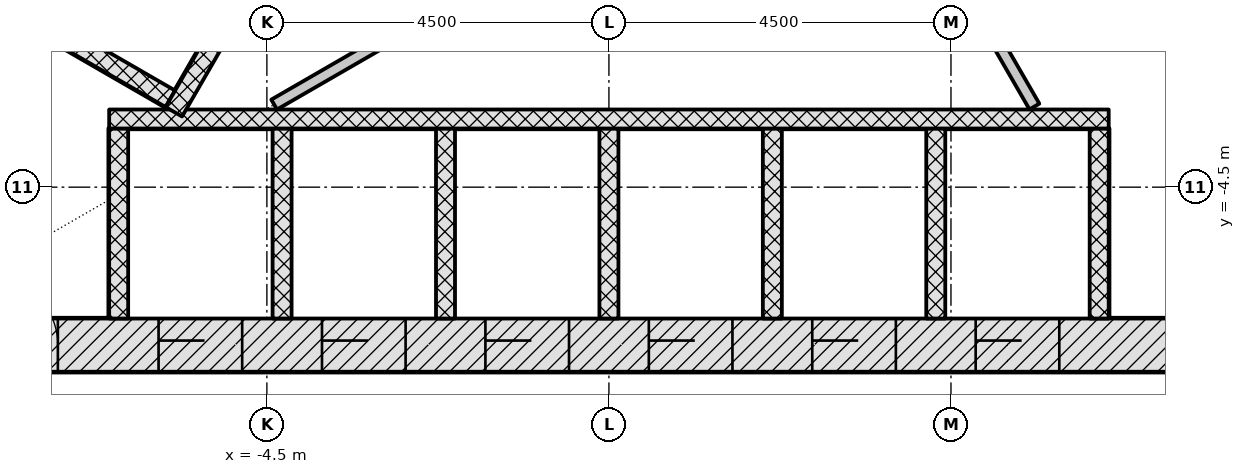
"""IFC4 building model, lengths in metres.
Left out: names, types, materials, properties, quantities, classifications, styles, units other than length and angle.
Written with IfcOpenShell. Run it as: python <this file> out.ifc"""

import sys

from ifc_helpers import new_model, si_unit, direction, frame, frame_2d, origin, place, context, subcontext, project, spatial, rectangle, extrude, element, fill, save


model = new_model("IFC4")
c1 = context("Model", 3, precision=1e-05, world=origin(), true_north=direction((0.0, 1.0)))
c2 = subcontext(c1, "Body", "Model", "MODEL_VIEW")
j1 = project(units=[si_unit("LENGTHUNIT", "METRE"), si_unit("PLANEANGLEUNIT", "RADIAN")], contexts=[c1])
p1 = place(None, origin())
s1 = spatial("IfcSite", under=j1, at=p1, CompositionType="ELEMENT")
p2 = place(p1, origin())
s2 = spatial("IfcBuilding", under=s1, at=p2, CompositionType="ELEMENT")
p3 = place(p2, frame((0.0, 0.0, 91.5)))
s3 = spatial("IfcBuildingStorey", under=s2, at=p3, CompositionType="ELEMENT", Elevation=91.5)
p4 = place(p3, frame((-9.229, -6.578, -0.2), z_axis=(0.0, 0.0, 1.0), x_axis=(1.0, 0.0, 0.0)))
e1 = element("IfcWall", 1, at=p4, inside=s3, PredefinedType="SHEAR", context=c2, shape_type="SweptSolid", body=[
    extrude(rectangle(XDim=18.458, YDim=0.7, at=frame_2d((9.229, 0.0))), origin(), (0.0, 0.0, 1.0), 3.6),
])
p5 = place(p4, frame((3.304, 0.0, 0.2)))
e2 = element("IfcOpeningElement", 2, at=p5, cuts=e1, PredefinedType="OPENING", context=c2, shape_type="SweptSolid", body=[
    extrude(rectangle(XDim=1.1, YDim=2.1, at=frame_2d((0.55, 1.05))), frame((0.0, 0.36, 0.0), z_axis=(0.0, -1.0, 0.0), x_axis=(1.0, 0.0, 0.0)), (0.0, 0.0, 1.0), 0.72),
])
p6 = place(p4, frame((5.454, 0.0, 0.2)))
e3 = element("IfcOpeningElement", 3, at=p6, cuts=e1, PredefinedType="OPENING", context=c2, shape_type="SweptSolid", body=[
    extrude(rectangle(XDim=1.1, YDim=2.1, at=frame_2d((0.55, 1.05))), frame((0.0, 0.36, 0.0), z_axis=(0.0, -1.0, 0.0), x_axis=(1.0, 0.0, 0.0)), (0.0, 0.0, 1.0), 0.72),
])
p7 = place(p4, frame((7.604, 0.0, 0.2)))
e4 = element("IfcOpeningElement", 4, at=p7, cuts=e1, PredefinedType="OPENING", context=c2, shape_type="SweptSolid", body=[
    extrude(rectangle(XDim=1.1, YDim=2.1, at=frame_2d((0.55, 1.05))), frame((0.0, 0.36, 0.0), z_axis=(0.0, -1.0, 0.0), x_axis=(1.0, 0.0, 0.0)), (0.0, 0.0, 1.0), 0.72),
])
p8 = place(p4, frame((9.754, 0.0, 0.2)))
e5 = element("IfcOpeningElement", 5, at=p8, cuts=e1, PredefinedType="OPENING", context=c2, shape_type="SweptSolid", body=[
    extrude(rectangle(XDim=1.1, YDim=2.1, at=frame_2d((0.55, 1.05))), frame((0.0, 0.36, 0.0), z_axis=(0.0, -1.0, 0.0), x_axis=(1.0, 0.0, 0.0)), (0.0, 0.0, 1.0), 0.72),
])
p9 = place(p4, frame((11.904, 0.0, 0.2)))
e6 = element("IfcOpeningElement", 6, at=p9, cuts=e1, PredefinedType="OPENING", context=c2, shape_type="SweptSolid", body=[
    extrude(rectangle(XDim=1.1, YDim=2.1, at=frame_2d((0.55, 1.05))), frame((0.0, 0.36, 0.0), z_axis=(0.0, -1.0, 0.0), x_axis=(1.0, 0.0, 0.0)), (0.0, 0.0, 1.0), 0.72),
])
p10 = place(p4, frame((14.054, 0.0, 0.2)))
e7 = element("IfcOpeningElement", 7, at=p10, cuts=e1, PredefinedType="OPENING", context=c2, shape_type="SweptSolid", body=[
    extrude(rectangle(XDim=1.1, YDim=2.1, at=frame_2d((0.55, 1.05))), frame((0.0, 0.36, 0.0), z_axis=(0.0, -1.0, 0.0), x_axis=(1.0, 0.0, 0.0)), (0.0, 0.0, 1.0), 0.72),
])
p11 = place(p4, frame((1.079, 0.0, 0.2)))
e8 = element("IfcOpeningElement", 8, at=p11, cuts=e1, PredefinedType="OPENING", context=c2, shape_type="SweptSolid", body=[
    extrude(rectangle(XDim=0.9, YDim=2.1, at=frame_2d((0.45, 1.05))), frame((0.0, 0.36, 0.0), z_axis=(0.0, -1.0, 0.0), x_axis=(1.0, 0.0, 0.0)), (0.0, 0.0, 1.0), 0.72),
])
p12 = place(p3, frame((10.311, -4.703, -0.2), z_axis=(0.0, 0.0, 1.0), x_axis=(-0.500001446645, 0.866024568562, 0.0)))
e9 = element("IfcWall", 9, at=p12, inside=s3, PredefinedType="SHEAR", context=c2, shape_type="SweptSolid", body=[
    extrude(rectangle(XDim=18.458, YDim=0.7, at=frame_2d((9.229, 0.0))), origin(), (0.0, 0.0, 1.0), 3.6),
])
p13 = place(p12, frame((8.7, 0.0, 0.2)))
e10 = element("IfcOpeningElement", 10, at=p13, cuts=e9, PredefinedType="OPENING", context=c2, shape_type="SweptSolid", body=[
    extrude(rectangle(XDim=1.0, YDim=2.1, at=frame_2d((0.5, 1.05))), frame((0.0, 0.36, 0.0), z_axis=(0.0, -1.0, 0.0), x_axis=(1.0, 0.0, 0.0)), (0.0, 0.0, 1.0), 0.72),
])
p14 = place(p12, frame((3.99, 0.0, 0.2)))
e11 = element("IfcOpeningElement", 11, at=p14, cuts=e9, PredefinedType="OPENING", context=c2, shape_type="SweptSolid", body=[
    extrude(rectangle(XDim=0.9, YDim=2.1, at=frame_2d((0.45, 1.05))), frame((0.0, 0.36, 0.0), z_axis=(0.0, -1.0, 0.0), x_axis=(1.0, 0.0, 0.0)), (0.0, 0.0, 1.0), 0.72),
])
p15 = place(p12, frame((13.539, 0.0, 0.2)))
e12 = element("IfcOpeningElement", 12, at=p15, cuts=e9, PredefinedType="OPENING", context=c2, shape_type="SweptSolid", body=[
    extrude(rectangle(XDim=0.9, YDim=2.1, at=frame_2d((0.45, 1.05))), frame((0.0, 0.36, 0.0), z_axis=(0.0, -1.0, 0.0), x_axis=(1.0, 0.0, 0.0)), (0.0, 0.0, 1.0), 0.72),
])
p16 = place(p3, frame((-1.083, 11.281, -0.2), z_axis=(0.0, 0.0, 1.0), x_axis=(-0.500001446645, -0.866024568562, 0.0)))
e13 = element("IfcWall", 13, at=p16, inside=s3, PredefinedType="SHEAR", context=c2, shape_type="SweptSolid", body=[
    extrude(rectangle(XDim=18.458, YDim=0.7, at=frame_2d((9.229, 0.0))), origin(), (0.0, 0.0, 1.0), 3.6),
])
p17 = place(p16, frame((8.979, 0.0, 0.2)))
e14 = element("IfcOpeningElement", 14, at=p17, cuts=e13, PredefinedType="OPENING", context=c2, shape_type="SweptSolid", body=[
    extrude(rectangle(XDim=1.2, YDim=2.1, at=frame_2d((0.6, 1.05))), frame((0.0, 0.36, 0.0), z_axis=(0.0, -1.0, 0.0), x_axis=(1.0, 0.0, 0.0)), (0.0, 0.0, 1.0), 0.72),
])
p18 = place(p16, frame((11.029, 0.0, 0.2)))
e15 = element("IfcOpeningElement", 15, at=p18, cuts=e13, PredefinedType="OPENING", context=c2, shape_type="SweptSolid", body=[
    extrude(rectangle(XDim=1.2, YDim=2.1, at=frame_2d((0.6, 1.05))), frame((0.0, 0.36, 0.0), z_axis=(0.0, -1.0, 0.0), x_axis=(1.0, 0.0, 0.0)), (0.0, 0.0, 1.0), 0.72),
])
for number, where, z_axis, x_axis in (
    (16, (-6.45, -6.228, -0.2), (0.0, 0.0, 1.0), (0.0, 1.0, 0.0)),
    (17, (-4.3, -6.228, -0.2), (0.0, 0.0, 1.0), (0.0, 1.0, 0.0)),
    (18, (-2.15, -6.228, -0.2), (0.0, 0.0, 1.0), (0.0, 1.0, 0.0)),
    (19, (0.0, -6.228, -0.2), (0.0, 0.0, 1.0), (0.0, 1.0, 0.0)),
    (20, (2.15, -6.228, -0.2), (0.0, 0.0, 1.0), (0.0, 1.0, 0.0)),
    (21, (4.3, -6.228, -0.2), (0.0, 0.0, 1.0), (0.0, 1.0, 0.0)),
    (22, (6.45, -6.228, -0.2), (0.0, 0.0, 1.0), (0.0, 1.0, 0.0)),
):
    element("IfcWall", number, at=place(p3, frame(where, z_axis=z_axis, x_axis=x_axis)), inside=s3, PredefinedType="PARTITIONING", context=c2, shape_type="SweptSolid", body=[
        extrude(rectangle(XDim=2.5, YDim=0.25, at=frame_2d((1.25, 0.0))), origin(), (0.0, 0.0, 1.0), 3.6),
    ])
p19 = place(p3, frame((-6.575, -3.603, 0.0), z_axis=(0.0, 0.0, 1.0), x_axis=(1.0, 0.0, 0.0)))
e23 = element("IfcWall", 23, at=p19, inside=s3, PredefinedType="PARTITIONING", context=c2, shape_type="SweptSolid", body=[
    extrude(rectangle(XDim=13.15, YDim=0.25, at=frame_2d((6.575, 0.0))), origin(), (0.0, 0.0, 1.0), 3.4),
])
p20 = place(p3, frame((-8.281, -1.887, -0.2), z_axis=(0.0, 0.0, 1.0), x_axis=(0.866032775405, -0.499987231761, 0.0)))
e24 = element("IfcWall", 24, at=p20, inside=s3, PredefinedType="PARTITIONING", context=c2, shape_type="SweptSolid", body=[
    extrude(rectangle(XDim=2.9, YDim=0.25, at=frame_2d((1.45, 0.0))), origin(), (0.0, 0.0, 1.0), 3.6),
])
p21 = place(p3, frame((0.176, 6.711, 0.0), z_axis=(0.0, 0.0, 1.0), x_axis=(-0.500004227369, -0.866022963098, 0.0)))
e25 = element("IfcWall", 25, at=p21, inside=s3, PredefinedType="PARTITIONING", context=c2, shape_type="SweptSolid", body=[
    extrude(rectangle(XDim=11.8, YDim=0.25, at=frame_2d((5.9, 0.0))), origin(), (0.0, 0.0, 1.0), 3.4),
])
p22 = place(p3, frame((-4.404, -3.413, 0.0), z_axis=(0.0, 0.0, 1.0), x_axis=(0.866022252853, 0.500005457533, 0.0)))
e26 = element("IfcWall", 26, at=p22, inside=s3, PredefinedType="PARTITIONING", context=c2, shape_type="SweptSolid", body=[
    extrude(rectangle(XDim=11.749, YDim=0.15, at=frame_2d((5.875, 0.0))), origin(), (0.0, 0.0, 1.0), 3.4),
])
p23 = place(p22, frame((3.875, 0.0, 0.0)))
e27 = element("IfcOpeningElement", 27, at=p23, cuts=e26, PredefinedType="OPENING", context=c2, shape_type="SweptSolid", body=[
    extrude(rectangle(XDim=0.9, YDim=2.1, at=frame_2d((0.45, 1.05))), frame((0.0, 0.085, 0.0), z_axis=(0.0, -1.0, 0.0), x_axis=(1.0, 0.0, 0.0)), (0.0, 0.0, 1.0), 0.17),
])
p24 = place(p3, frame((5.598, -3.439, 0.0), z_axis=(0.0, 0.0, 1.0), x_axis=(-0.500007155043, 0.866021272779, 0.0)))
e28 = element("IfcWall", 28, at=p24, inside=s3, PredefinedType="PARTITIONING", context=c2, shape_type="SweptSolid", body=[
    extrude(rectangle(XDim=4.949, YDim=0.15, at=frame_2d((2.474, 0.0))), origin(), (0.0, 0.0, 1.0), 3.4),
])
p25 = place(p3, frame((-16.169, -3.099, 0.0), z_axis=(0.0, 0.0, 1.0), x_axis=(0.499999805269, 0.866025516212, 0.0)))
e29 = element("IfcWall", 29, at=p25, inside=s3, PredefinedType="PARTITIONING", context=c2, shape_type="SweptSolid", body=[
    extrude(rectangle(XDim=22.097, YDim=0.15, at=frame_2d((11.049, 0.0))), origin(), (0.0, 0.0, 1.0), 2.778),
])
p26 = place(p25, frame((12.221, 0.0, 0.0)))
e30 = element("IfcOpeningElement", 30, at=p26, cuts=e29, PredefinedType="OPENING", context=c2, shape_type="SweptSolid", body=[
    extrude(rectangle(XDim=1.5, YDim=2.1, at=frame_2d((0.75, 1.05))), frame((0.0, 0.085, 0.0), z_axis=(0.0, -1.0, 0.0), x_axis=(1.0, 0.0, 0.0)), (0.0, 0.0, 1.0), 0.17),
])
p27 = place(p25, frame((3.403, 0.0, 0.0)))
e31 = element("IfcOpeningElement", 31, at=p27, cuts=e29, PredefinedType="OPENING", context=c2, shape_type="SweptSolid", body=[
    extrude(rectangle(XDim=1.5, YDim=2.1, at=frame_2d((0.75, 1.05))), frame((0.0, 0.085, 0.0), z_axis=(0.0, -1.0, 0.0), x_axis=(1.0, 0.0, 0.0)), (0.0, 0.0, 1.0), 0.17),
])
p28 = place(p3, frame((5.289, 8.446, 0.0), z_axis=(0.0, 0.0, 1.0), x_axis=(0.499996620721, -0.866027354803, 0.0)))
e32 = element("IfcWall", 32, at=p28, inside=s3, PredefinedType="PARTITIONING", context=c2, shape_type="SweptSolid", body=[
    extrude(rectangle(XDim=15.057, YDim=0.15, at=frame_2d((7.528, 0.0))), origin(), (0.0, 0.0, 1.0), 2.778),
])
p29 = place(p28, frame((12.566, 0.0, 0.0)))
e33 = element("IfcOpeningElement", 33, at=p29, cuts=e32, PredefinedType="OPENING", context=c2, shape_type="SweptSolid", body=[
    extrude(rectangle(XDim=1.0, YDim=2.1, at=frame_2d((0.5, 1.05))), frame((0.0, 0.085, 0.0), z_axis=(0.0, -1.0, 0.0), x_axis=(1.0, 0.0, 0.0)), (0.0, 0.0, 1.0), 0.17),
])
p30 = place(p28, frame((9.395, 0.0, 0.0)))
e34 = element("IfcOpeningElement", 34, at=p30, cuts=e32, PredefinedType="OPENING", context=c2, shape_type="SweptSolid", body=[
    extrude(rectangle(XDim=1.0, YDim=2.1, at=frame_2d((0.5, 1.05))), frame((0.0, 0.085, 0.0), z_axis=(0.0, -1.0, 0.0), x_axis=(1.0, 0.0, 0.0)), (0.0, 0.0, 1.0), 0.17),
])
p31 = place(p28, frame((6.845, 0.0, 0.0)))
e35 = element("IfcOpeningElement", 35, at=p31, cuts=e32, PredefinedType="OPENING", context=c2, shape_type="SweptSolid", body=[
    extrude(rectangle(XDim=1.0, YDim=2.1, at=frame_2d((0.5, 1.05))), frame((0.0, 0.085, 0.0), z_axis=(0.0, -1.0, 0.0), x_axis=(1.0, 0.0, 0.0)), (0.0, 0.0, 1.0), 0.17),
])
p32 = place(p28, frame((3.537, 0.0, 0.0)))
e36 = element("IfcOpeningElement", 36, at=p32, cuts=e32, PredefinedType="OPENING", context=c2, shape_type="SweptSolid", body=[
    extrude(rectangle(XDim=1.5, YDim=2.1, at=frame_2d((0.75, 1.05))), frame((0.0, 0.085, 0.0), z_axis=(0.0, -1.0, 0.0), x_axis=(1.0, 0.0, 0.0)), (0.0, 0.0, 1.0), 0.17),
])
p33 = place(p5, origin())
e37 = element("IfcDoor", 37, at=p33, inside=s3, OperationType="DOUBLE_DOOR_SLIDING", PredefinedType="DOOR", context=c2, shape_type="SweptSolid", body=[
    extrude(rectangle(XDim=1.1, YDim=2.1, at=frame_2d((0.55, 1.05))), frame((0.0, 0.025, 0.0), z_axis=(0.0, -1.0, 0.0), x_axis=(1.0, 0.0, 0.0)), (0.0, 0.0, 1.0), 0.05),
])
fill(e2, e37)
p34 = place(p6, origin())
e38 = element("IfcDoor", 38, at=p34, inside=s3, OperationType="DOUBLE_DOOR_SLIDING", PredefinedType="DOOR", context=c2, shape_type="SweptSolid", body=[
    extrude(rectangle(XDim=1.1, YDim=2.1, at=frame_2d((0.55, 1.05))), frame((0.0, 0.025, 0.0), z_axis=(0.0, -1.0, 0.0), x_axis=(1.0, 0.0, 0.0)), (0.0, 0.0, 1.0), 0.05),
])
fill(e3, e38)
p35 = place(p7, origin())
e39 = element("IfcDoor", 39, at=p35, inside=s3, OperationType="DOUBLE_DOOR_SLIDING", PredefinedType="DOOR", context=c2, shape_type="SweptSolid", body=[
    extrude(rectangle(XDim=1.1, YDim=2.1, at=frame_2d((0.55, 1.05))), frame((0.0, 0.025, 0.0), z_axis=(0.0, -1.0, 0.0), x_axis=(1.0, 0.0, 0.0)), (0.0, 0.0, 1.0), 0.05),
])
fill(e4, e39)
p36 = place(p8, origin())
e40 = element("IfcDoor", 40, at=p36, inside=s3, OperationType="DOUBLE_DOOR_SLIDING", PredefinedType="DOOR", context=c2, shape_type="SweptSolid", body=[
    extrude(rectangle(XDim=1.1, YDim=2.1, at=frame_2d((0.55, 1.05))), frame((0.0, 0.025, 0.0), z_axis=(0.0, -1.0, 0.0), x_axis=(1.0, 0.0, 0.0)), (0.0, 0.0, 1.0), 0.05),
])
fill(e5, e40)
p37 = place(p9, origin())
e41 = element("IfcDoor", 41, at=p37, inside=s3, OperationType="DOUBLE_DOOR_SLIDING", PredefinedType="DOOR", context=c2, shape_type="SweptSolid", body=[
    extrude(rectangle(XDim=1.1, YDim=2.1, at=frame_2d((0.55, 1.05))), frame((0.0, 0.025, 0.0), z_axis=(0.0, -1.0, 0.0), x_axis=(1.0, 0.0, 0.0)), (0.0, 0.0, 1.0), 0.05),
])
fill(e6, e41)
p38 = place(p10, origin())
e42 = element("IfcDoor", 42, at=p38, inside=s3, OperationType="DOUBLE_DOOR_SLIDING", PredefinedType="DOOR", context=c2, shape_type="SweptSolid", body=[
    extrude(rectangle(XDim=1.1, YDim=2.1, at=frame_2d((0.55, 1.05))), frame((0.0, 0.025, 0.0), z_axis=(0.0, -1.0, 0.0), x_axis=(1.0, 0.0, 0.0)), (0.0, 0.0, 1.0), 0.05),
])
fill(e7, e42)
p39 = place(p11, origin())
e43 = element("IfcDoor", 43, at=p39, inside=s3, OperationType="SINGLE_SWING_LEFT", PredefinedType="DOOR", context=c2, shape_type="SweptSolid", body=[
    extrude(rectangle(XDim=0.9, YDim=2.1, at=frame_2d((0.45, 1.05))), frame((0.0, 0.075, 0.0), z_axis=(0.0, -1.0, 0.0), x_axis=(1.0, 0.0, 0.0)), (0.0, 0.0, 1.0), 0.15),
])
fill(e8, e43)
save(model, sys.argv[1])
